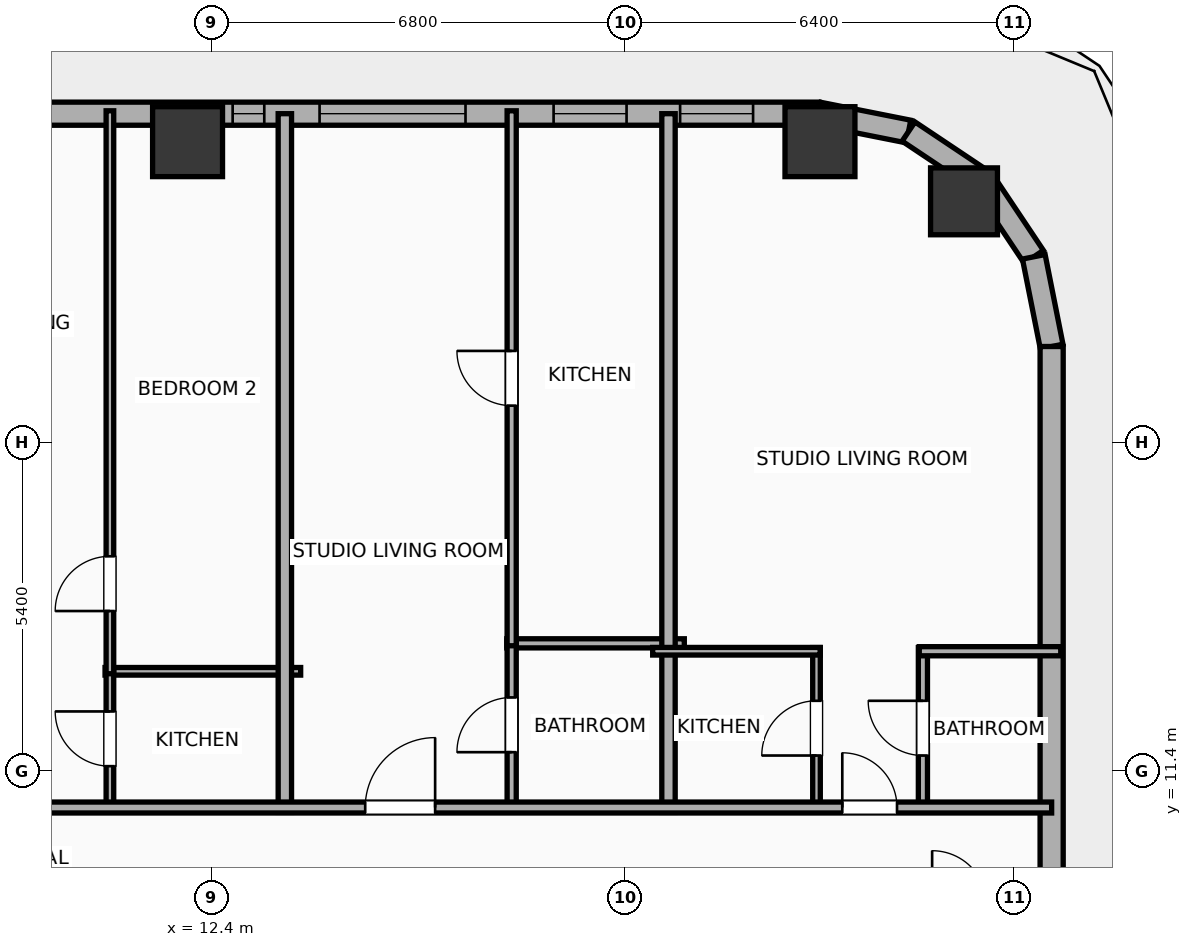
"""IFC4 building model, lengths in metres.
Left out: names, types, materials, properties, quantities, classifications, styles, units other than length and angle.
Written with IfcOpenShell. Run it as: python <this file> out.ifc"""

import sys

from ifc_helpers import new_model, si_unit, direction, frame, frame_2d, origin, origin_2d, place, context, subcontext, project, spatial, rectangle, hollow_rectangle, hollow_circle, extrude, element, fill, save


model = new_model("IFC4")
c1 = context("Model", 3, precision=1e-05, world=origin(), true_north=direction((0.0, 1.0)))
c2 = subcontext(c1, "Body", "Model", "MODEL_VIEW")
j1 = project(units=[si_unit("LENGTHUNIT", "METRE"), si_unit("PLANEANGLEUNIT", "RADIAN")], contexts=[c1])
p1 = place(None, origin())
s1 = spatial("IfcSite", under=j1, at=p1, CompositionType="ELEMENT")
p2 = place(p1, origin())
s2 = spatial("IfcBuilding", under=s1, at=p2, CompositionType="ELEMENT")
p3 = place(p2, frame((0.0, 0.0, 53.3)))
s3 = spatial("IfcBuildingStorey", under=s2, at=p3, CompositionType="ELEMENT", Elevation=53.3)
p4 = place(p3, frame((24.769, 20.769, 0.0), z_axis=(0.0, 0.0, 1.0), x_axis=(1.0, 0.0, 0.0)))
e1 = element("IfcColumn", 1, at=p4, inside=s3, PredefinedType="COLUMN", context=c2, shape_type="SweptSolid", body=[
    extrude(hollow_circle(Radius=0.55, WallThickness=0.036, at=origin_2d()), origin(), (0.0, 0.0, 1.0), 3.9),
])
for number, where, z_axis, x_axis in (
    (2, (22.4, 21.75, 0.0), (0.0, 0.0, 1.0), (1.0, 0.0, 0.0)),
    (3, (12.0, 21.75, 0.0), (0.0, 0.0, 1.0), (1.0, 0.0, 0.0)),
):
    element("IfcColumn", number, at=place(p3, frame(where, z_axis=z_axis, x_axis=x_axis)), inside=s3, PredefinedType="COLUMN", context=c2, shape_type="SweptSolid", body=[
        extrude(hollow_rectangle(XDim=1.15, YDim=1.15, WallThickness=0.04, at=origin_2d()), origin(), (0.0, 0.0, 1.0), 3.9),
    ])
p5 = place(p3, frame((-29.581, 22.21, 0.0), z_axis=(0.0, 0.0, 1.0), x_axis=(1.0, 0.0, 0.0)))
e4 = element("IfcWall", 4, at=p5, inside=s3, PredefinedType="ELEMENTEDWALL", context=c2, shape_type="SweptSolid", body=[
    extrude(rectangle(XDim=51.963, YDim=0.38, at=frame_2d((25.981, 0.0))), origin(), (0.0, 0.0, 1.0), 3.65),
])
p6 = place(p5, frame((6.61, 0.0, 0.75)))
e5 = element("IfcOpeningElement", 5, at=p6, cuts=e4, PredefinedType="OPENING", context=c2, shape_type="SweptSolid", body=[
    extrude(rectangle(XDim=2.4, YDim=2.1, at=frame_2d((1.2, 1.05))), frame((0.0, 0.2, 0.0), z_axis=(0.0, -1.0, 0.0), x_axis=(1.0, 0.0, 0.0)), (0.0, 0.0, 1.0), 0.4),
])
p7 = place(p5, frame((26.431, 0.0, 0.75)))
e6 = element("IfcOpeningElement", 6, at=p7, cuts=e4, PredefinedType="OPENING", context=c2, shape_type="SweptSolid", body=[
    extrude(rectangle(XDim=2.4, YDim=2.1, at=frame_2d((1.2, 1.05))), frame((0.0, 0.2, 0.0), z_axis=(0.0, -1.0, 0.0), x_axis=(1.0, 0.0, 0.0)), (0.0, 0.0, 1.0), 0.4),
])
p8 = place(p5, frame((43.752, 0.0, 0.75)))
e7 = element("IfcOpeningElement", 7, at=p8, cuts=e4, PredefinedType="OPENING", context=c2, shape_type="SweptSolid", body=[
    extrude(rectangle(XDim=2.4, YDim=2.1, at=frame_2d((1.2, 1.05))), frame((0.0, 0.2, 0.0), z_axis=(0.0, -1.0, 0.0), x_axis=(1.0, 0.0, 0.0)), (0.0, 0.0, 1.0), 0.4),
])
p9 = place(p5, frame((2.789, 0.0, 0.75)))
e8 = element("IfcOpeningElement", 8, at=p9, cuts=e4, PredefinedType="OPENING", context=c2, shape_type="SweptSolid", body=[
    extrude(rectangle(XDim=1.2, YDim=2.05, at=frame_2d((0.6, 1.025))), frame((0.0, 0.2, 0.0), z_axis=(0.0, -1.0, 0.0), x_axis=(1.0, 0.0, 0.0)), (0.0, 0.0, 1.0), 0.4),
])
p10 = place(p5, frame((16.831, 0.0, 0.75)))
e9 = element("IfcOpeningElement", 9, at=p10, cuts=e4, PredefinedType="OPENING", context=c2, shape_type="SweptSolid", body=[
    extrude(rectangle(XDim=1.2, YDim=2.05, at=frame_2d((0.6, 1.025))), frame((0.0, 0.2, 0.0), z_axis=(0.0, -1.0, 0.0), x_axis=(1.0, 0.0, 0.0)), (0.0, 0.0, 1.0), 0.4),
])
p11 = place(p5, frame((13.136, 0.0, 0.75)))
e10 = element("IfcOpeningElement", 10, at=p11, cuts=e4, PredefinedType="OPENING", context=c2, shape_type="SweptSolid", body=[
    extrude(rectangle(XDim=1.2, YDim=2.05, at=frame_2d((0.6, 1.025))), frame((0.0, 0.2, 0.0), z_axis=(0.0, -1.0, 0.0), x_axis=(1.0, 0.0, 0.0)), (0.0, 0.0, 1.0), 0.4),
])
p12 = place(p5, frame((21.456, 0.0, 0.75)))
e11 = element("IfcOpeningElement", 11, at=p12, cuts=e4, PredefinedType="OPENING", context=c2, shape_type="SweptSolid", body=[
    extrude(rectangle(XDim=0.52, YDim=2.05, at=frame_2d((0.26, 1.025))), frame((0.0, 0.2, 0.0), z_axis=(0.0, -1.0, 0.0), x_axis=(1.0, 0.0, 0.0)), (0.0, 0.0, 1.0), 0.4),
])
p13 = place(p5, frame((23.507, 0.0, 0.75)))
e12 = element("IfcOpeningElement", 12, at=p13, cuts=e4, PredefinedType="OPENING", context=c2, shape_type="SweptSolid", body=[
    extrude(rectangle(XDim=1.2, YDim=2.05, at=frame_2d((0.6, 1.025))), frame((0.0, 0.2, 0.0), z_axis=(0.0, -1.0, 0.0), x_axis=(1.0, 0.0, 0.0)), (0.0, 0.0, 1.0), 0.4),
])
p14 = place(p5, frame((37.494, 0.0, 0.75)))
e13 = element("IfcOpeningElement", 13, at=p14, cuts=e4, PredefinedType="OPENING", context=c2, shape_type="SweptSolid", body=[
    extrude(rectangle(XDim=1.2, YDim=2.05, at=frame_2d((0.6, 1.025))), frame((0.0, 0.2, 0.0), z_axis=(0.0, -1.0, 0.0), x_axis=(1.0, 0.0, 0.0)), (0.0, 0.0, 1.0), 0.4),
])
p15 = place(p5, frame((33.733, 0.0, 0.75)))
e14 = element("IfcOpeningElement", 14, at=p15, cuts=e4, PredefinedType="OPENING", context=c2, shape_type="SweptSolid", body=[
    extrude(rectangle(XDim=1.2, YDim=2.05, at=frame_2d((0.6, 1.025))), frame((0.0, 0.2, 0.0), z_axis=(0.0, -1.0, 0.0), x_axis=(1.0, 0.0, 0.0)), (0.0, 0.0, 1.0), 0.4),
])
p16 = place(p5, frame((42.323, 0.0, 0.75)))
e15 = element("IfcOpeningElement", 15, at=p16, cuts=e4, PredefinedType="OPENING", context=c2, shape_type="SweptSolid", body=[
    extrude(rectangle(XDim=0.52, YDim=2.05, at=frame_2d((0.26, 1.025))), frame((0.0, 0.2, 0.0), z_axis=(0.0, -1.0, 0.0), x_axis=(1.0, 0.0, 0.0)), (0.0, 0.0, 1.0), 0.4),
])
p17 = place(p5, frame((47.601, 0.0, 0.75)))
e16 = element("IfcOpeningElement", 16, at=p17, cuts=e4, PredefinedType="OPENING", context=c2, shape_type="SweptSolid", body=[
    extrude(rectangle(XDim=1.2, YDim=2.05, at=frame_2d((0.6, 1.025))), frame((0.0, 0.2, 0.0), z_axis=(0.0, -1.0, 0.0), x_axis=(1.0, 0.0, 0.0)), (0.0, 0.0, 1.0), 0.4),
])
p18 = place(p5, frame((49.681, 0.0, 0.75)))
e17 = element("IfcOpeningElement", 17, at=p18, cuts=e4, PredefinedType="OPENING", context=c2, shape_type="SweptSolid", body=[
    extrude(rectangle(XDim=1.2, YDim=2.05, at=frame_2d((0.6, 1.025))), frame((0.0, 0.2, 0.0), z_axis=(0.0, -1.0, 0.0), x_axis=(1.0, 0.0, 0.0)), (0.0, 0.0, 1.0), 0.4),
])
p19 = place(p3, frame((22.381, 22.21, 0.0), z_axis=(0.0, 0.0, 1.0), x_axis=(0.980786132421, -0.195086038585, 0.0)))
e18 = element("IfcWall", 18, at=p19, inside=s3, PredefinedType="ELEMENTEDWALL", context=c2, shape_type="SweptSolid", body=[
    extrude(rectangle(XDim=1.504, YDim=0.38, at=frame_2d((0.752, 0.0))), origin(), (0.0, 0.0, 1.0), 3.65),
])
for number, where, z_axis, x_axis in (
    (19, (23.857, 21.917, 0.0), (0.0, 0.0, 1.0), (0.831, -0.556, 0.0)),
    (20, (25.091, 21.091, 0.0), (0.0, 0.0, 1.0), (0.556, -0.831, 0.0)),
):
    element("IfcWall", number, at=place(p3, frame(where, z_axis=z_axis, x_axis=x_axis)), inside=s3, PredefinedType="ELEMENTEDWALL", context=c2, shape_type="SweptSolid", body=[
        extrude(rectangle(XDim=1.485, YDim=0.38, at=frame_2d((0.743, 0.0))), origin(), (0.0, 0.0, 1.0), 3.65),
    ])
p20 = place(p3, frame((25.917, 19.857, 0.0), z_axis=(0.0, 0.0, 1.0), x_axis=(0.195086038585, -0.980786132421, 0.0)))
e21 = element("IfcWall", 21, at=p20, inside=s3, PredefinedType="ELEMENTEDWALL", context=c2, shape_type="SweptSolid", body=[
    extrude(rectangle(XDim=1.504, YDim=0.38, at=frame_2d((0.752, 0.0))), origin(), (0.0, 0.0, 1.0), 3.65),
])
p21 = place(p3, frame((26.21, 18.381, 0.0), z_axis=(0.0, 0.0, 1.0), x_axis=(0.0, -1.0, 0.0)))
e22 = element("IfcWall", 22, at=p21, inside=s3, PredefinedType="ELEMENTEDWALL", context=c2, shape_type="SweptSolid", body=[
    extrude(rectangle(XDim=36.763, YDim=0.38, at=frame_2d((18.381, 0.0))), origin(), (0.0, 0.0, 1.0), 3.65),
])
p22 = place(p21, frame((33.537, 0.0, 0.75)))
e23 = element("IfcOpeningElement", 23, at=p22, cuts=e22, PredefinedType="OPENING", context=c2, shape_type="SweptSolid", body=[
    extrude(rectangle(XDim=1.2, YDim=2.05, at=frame_2d((0.6, 1.025))), frame((0.0, 0.2, 0.0), z_axis=(0.0, -1.0, 0.0), x_axis=(1.0, 0.0, 0.0)), (0.0, 0.0, 1.0), 0.4),
])
p23 = place(p3, frame((10.643, 13.04, 0.0), z_axis=(0.0, 0.0, 1.0), x_axis=(1.0, 0.0, 0.0)))
e24 = element("IfcWall", 24, at=p23, inside=s3, PredefinedType="PARTITIONING", context=c2, shape_type="SweptSolid", body=[
    extrude(rectangle(XDim=3.217, YDim=0.125, at=frame_2d((1.608, 0.0))), origin(), (0.0, 0.0, 1.0), 3.65),
])
p24 = place(p3, frame((10.723, 10.78, 0.0), z_axis=(0.0, 0.0, 1.0), x_axis=(0.0, 1.0, 0.0)))
e25 = element("IfcWall", 25, at=p24, inside=s3, PredefinedType="PARTITIONING", context=c2, shape_type="SweptSolid", body=[
    extrude(rectangle(XDim=2.3, YDim=0.125, at=frame_2d((1.15, 0.0))), origin(), (0.0, 0.0, 1.0), 3.65),
])
p25 = place(p24, frame((0.7, 0.0, 0.0)))
e26 = element("IfcOpeningElement", 26, at=p25, cuts=e25, PredefinedType="OPENING", context=c2, shape_type="SweptSolid", body=[
    extrude(rectangle(XDim=0.9, YDim=2.05, at=frame_2d((0.45, 1.025))), frame((0.0, 0.073, 0.0), z_axis=(0.0, -1.0, 0.0), x_axis=(1.0, 0.0, 0.0)), (0.0, 0.0, 1.0), 0.145),
])
p26 = place(p3, frame((10.723, 13.0, 0.0), z_axis=(0.0, 0.0, 1.0), x_axis=(0.0, 1.0, 0.0)))
e27 = element("IfcWall", 27, at=p26, inside=s3, PredefinedType="PARTITIONING", context=c2, shape_type="SweptSolid", body=[
    extrude(rectangle(XDim=9.258, YDim=0.125, at=frame_2d((4.629, 0.0))), origin(), (0.0, 0.0, 1.0), 3.65),
])
p27 = place(p26, frame((1.031, 0.0, 0.0)))
e28 = element("IfcOpeningElement", 28, at=p27, cuts=e27, PredefinedType="OPENING", context=c2, shape_type="SweptSolid", body=[
    extrude(rectangle(XDim=0.9, YDim=2.05, at=frame_2d((0.45, 1.025))), frame((0.0, 0.073, 0.0), z_axis=(0.0, -1.0, 0.0), x_axis=(1.0, 0.0, 0.0)), (0.0, 0.0, 1.0), 0.145),
])
p28 = place(p3, frame((13.6, 10.72, 0.0), z_axis=(0.0, 0.0, 1.0), x_axis=(0.0, 1.0, 0.0)))
e29 = element("IfcWall", 29, at=p28, inside=s3, PredefinedType="PARTITIONING", context=c2, shape_type="SweptSolid", body=[
    extrude(rectangle(XDim=11.49, YDim=0.22, at=frame_2d((5.745, 0.0))), origin(), (0.0, 0.0, 1.0), 3.65),
])
p29 = place(p3, frame((17.25, 13.5, 0.0), z_axis=(0.0, 0.0, 1.0), x_axis=(1.0, 0.0, 0.0)))
e30 = element("IfcWall", 30, at=p29, inside=s3, PredefinedType="PLUMBINGWALL", context=c2, shape_type="SweptSolid", body=[
    extrude(rectangle(XDim=2.919, YDim=0.15, at=frame_2d((1.459, 0.0))), origin(), (0.0, 0.0, 1.0), 3.65),
])
p30 = place(p3, frame((17.33, 10.78, 0.0), z_axis=(0.0, 0.0, 1.0), x_axis=(0.0, 1.0, 0.0)))
e31 = element("IfcWall", 31, at=p30, inside=s3, PredefinedType="PLUMBINGWALL", context=c2, shape_type="SweptSolid", body=[
    extrude(rectangle(XDim=2.76, YDim=0.15, at=frame_2d((1.38, 0.0))), origin(), (0.0, 0.0, 1.0), 3.65),
])
p31 = place(p30, frame((0.93, 0.0, 0.0)))
e32 = element("IfcOpeningElement", 32, at=p31, cuts=e31, PredefinedType="OPENING", context=c2, shape_type="SweptSolid", body=[
    extrude(rectangle(XDim=0.9, YDim=2.05, at=frame_2d((0.45, 1.025))), frame((0.0, 0.085, 0.0), z_axis=(0.0, -1.0, 0.0), x_axis=(1.0, 0.0, 0.0)), (0.0, 0.0, 1.0), 0.17),
])
p32 = place(p3, frame((17.33, 13.46, 0.0), z_axis=(0.0, 0.0, 1.0), x_axis=(0.0, 1.0, 0.0)))
e33 = element("IfcWall", 33, at=p32, inside=s3, PredefinedType="PLUMBINGWALL", context=c2, shape_type="SweptSolid", body=[
    extrude(rectangle(XDim=8.798, YDim=0.15, at=frame_2d((4.399, 0.0))), origin(), (0.0, 0.0, 1.0), 3.65),
])
p33 = place(p32, frame((3.949, 0.0, 0.0)))
e34 = element("IfcOpeningElement", 34, at=p33, cuts=e33, PredefinedType="OPENING", context=c2, shape_type="SweptSolid", body=[
    extrude(rectangle(XDim=0.9, YDim=2.05, at=frame_2d((0.45, 1.025))), frame((0.0, 0.085, 0.0), z_axis=(0.0, -1.0, 0.0), x_axis=(1.0, 0.0, 0.0)), (0.0, 0.0, 1.0), 0.17),
])
p34 = place(p3, frame((19.909, 10.72, 0.0), z_axis=(0.0, 0.0, 1.0), x_axis=(0.0, 1.0, 0.0)))
e35 = element("IfcWall", 35, at=p34, inside=s3, PredefinedType="PARTITIONING", context=c2, shape_type="SweptSolid", body=[
    extrude(rectangle(XDim=11.49, YDim=0.22, at=frame_2d((5.745, 0.0))), origin(), (0.0, 0.0, 1.0), 3.65),
])
p35 = place(p3, frame((22.343, 10.78, 0.0), z_axis=(0.0, 0.0, 1.0), x_axis=(0.0, 1.0, 0.0)))
e36 = element("IfcWall", 36, at=p35, inside=s3, PredefinedType="PARTITIONING", context=c2, shape_type="SweptSolid", body=[
    extrude(rectangle(XDim=2.65, YDim=0.125, at=frame_2d((1.325, 0.0))), origin(), (0.0, 0.0, 1.0), 3.65),
])
p36 = place(p35, frame((0.875, 0.0, 0.0)))
e37 = element("IfcOpeningElement", 37, at=p36, cuts=e36, PredefinedType="OPENING", context=c2, shape_type="SweptSolid", body=[
    extrude(rectangle(XDim=0.9, YDim=2.05, at=frame_2d((0.45, 1.025))), frame((0.0, 0.073, 0.0), z_axis=(0.0, -1.0, 0.0), x_axis=(1.0, 0.0, 0.0)), (0.0, 0.0, 1.0), 0.145),
])
p37 = place(p3, frame((24.093, 10.78, 0.0), z_axis=(0.0, 0.0, 1.0), x_axis=(0.0, 1.0, 0.0)))
e38 = element("IfcWall", 38, at=p37, inside=s3, PredefinedType="PLUMBINGWALL", context=c2, shape_type="SweptSolid", body=[
    extrude(rectangle(XDim=2.65, YDim=0.15, at=frame_2d((1.325, 0.0))), origin(), (0.0, 0.0, 1.0), 3.65),
])
p38 = place(p37, frame((0.875, 0.0, 0.0)))
e39 = element("IfcOpeningElement", 39, at=p38, cuts=e38, PredefinedType="OPENING", context=c2, shape_type="SweptSolid", body=[
    extrude(rectangle(XDim=0.9, YDim=2.05, at=frame_2d((0.45, 1.025))), frame((0.0, 0.085, 0.0), z_axis=(0.0, -1.0, 0.0), x_axis=(1.0, 0.0, 0.0)), (0.0, 0.0, 1.0), 0.17),
])
p39 = place(p3, frame((19.649, 13.37, 0.0), z_axis=(0.0, 0.0, 1.0), x_axis=(1.0, 0.0, 0.0)))
e40 = element("IfcWall", 40, at=p39, inside=s3, PredefinedType="PARTITIONING", context=c2, shape_type="SweptSolid", body=[
    extrude(rectangle(XDim=2.754, YDim=0.125, at=frame_2d((1.377, 0.0))), origin(), (0.0, 0.0, 1.0), 3.65),
])
p40 = place(p3, frame((24.033, 13.37, 0.0), z_axis=(0.0, 0.0, 1.0), x_axis=(1.0, 0.0, 0.0)))
e41 = element("IfcWall", 41, at=p40, inside=s3, PredefinedType="PLUMBINGWALL", context=c2, shape_type="SweptSolid", body=[
    extrude(rectangle(XDim=2.327, YDim=0.15, at=frame_2d((1.164, 0.0))), origin(), (0.0, 0.0, 1.0), 3.65),
])
p41 = place(p3, frame((-33.41, 10.8, 0.0), z_axis=(0.0, 0.0, 1.0), x_axis=(1.0, 0.0, 0.0)))
e42 = element("IfcWall", 42, at=p41, inside=s3, PredefinedType="PARTITIONING", context=c2, shape_type="SweptSolid", body=[
    extrude(rectangle(XDim=59.62, YDim=0.18, at=frame_2d((29.81, 0.0))), origin(), (0.0, 0.0, 1.0), 3.65),
])
p42 = place(p41, frame((2.501, 0.0, 0.0)))
e43 = element("IfcOpeningElement", 43, at=p42, cuts=e42, PredefinedType="OPENING", context=c2, shape_type="SweptSolid", body=[
    extrude(rectangle(XDim=0.9, YDim=2.05, at=frame_2d((0.45, 1.025))), frame((0.0, 0.1, 0.0), z_axis=(0.0, -1.0, 0.0), x_axis=(1.0, 0.0, 0.0)), (0.0, 0.0, 1.0), 0.2),
])
p43 = place(p41, frame((10.156, 0.0, 0.0)))
e44 = element("IfcOpeningElement", 44, at=p43, cuts=e42, PredefinedType="OPENING", context=c2, shape_type="SweptSolid", body=[
    extrude(rectangle(XDim=1.15, YDim=2.05, at=frame_2d((0.575, 1.025))), frame((0.0, 0.1, 0.0), z_axis=(0.0, -1.0, 0.0), x_axis=(1.0, 0.0, 0.0)), (0.0, 0.0, 1.0), 0.2),
])
p44 = place(p41, frame((20.686, 0.0, 0.0)))
e45 = element("IfcOpeningElement", 45, at=p44, cuts=e42, PredefinedType="OPENING", context=c2, shape_type="SweptSolid", body=[
    extrude(rectangle(XDim=1.15, YDim=2.05, at=frame_2d((0.575, 1.025))), frame((0.0, 0.1, 0.0), z_axis=(0.0, -1.0, 0.0), x_axis=(1.0, 0.0, 0.0)), (0.0, 0.0, 1.0), 0.2),
])
p45 = place(p41, frame((30.982, 0.0, 0.0)))
e46 = element("IfcOpeningElement", 46, at=p45, cuts=e42, PredefinedType="OPENING", context=c2, shape_type="SweptSolid", body=[
    extrude(rectangle(XDim=1.15, YDim=2.05, at=frame_2d((0.575, 1.025))), frame((0.0, 0.1, 0.0), z_axis=(0.0, -1.0, 0.0), x_axis=(1.0, 0.0, 0.0)), (0.0, 0.0, 1.0), 0.2),
])
p46 = place(p41, frame((41.35, 0.0, 0.0)))
e47 = element("IfcOpeningElement", 47, at=p46, cuts=e42, PredefinedType="OPENING", context=c2, shape_type="SweptSolid", body=[
    extrude(rectangle(XDim=1.15, YDim=2.05, at=frame_2d((0.575, 1.025))), frame((0.0, 0.1, 0.0), z_axis=(0.0, -1.0, 0.0), x_axis=(1.0, 0.0, 0.0)), (0.0, 0.0, 1.0), 0.2),
])
p47 = place(p41, frame((48.331, 0.0, 0.0)))
e48 = element("IfcOpeningElement", 48, at=p47, cuts=e42, PredefinedType="OPENING", context=c2, shape_type="SweptSolid", body=[
    extrude(rectangle(XDim=1.15, YDim=2.05, at=frame_2d((0.575, 1.025))), frame((0.0, 0.1, 0.0), z_axis=(0.0, -1.0, 0.0), x_axis=(1.0, 0.0, 0.0)), (0.0, 0.0, 1.0), 0.2),
])
p48 = place(p41, frame((56.177, 0.0, 0.0)))
e49 = element("IfcOpeningElement", 49, at=p48, cuts=e42, PredefinedType="OPENING", context=c2, shape_type="SweptSolid", body=[
    extrude(rectangle(XDim=0.9, YDim=2.05, at=frame_2d((0.45, 1.025))), frame((0.0, 0.1, 0.0), z_axis=(0.0, -1.0, 0.0), x_axis=(1.0, 0.0, 0.0)), (0.0, 0.0, 1.0), 0.2),
])
p49 = place(p8, origin())
e50 = element("IfcWindow", 50, at=p49, inside=s3, PartitioningType="SINGLE_PANEL", PredefinedType="WINDOW", context=c2, shape_type="SweptSolid", body=[
    extrude(rectangle(XDim=2.4, YDim=2.1, at=frame_2d((1.2, 1.05))), frame((0.0, 0.03, 0.0), z_axis=(0.0, -1.0, 0.0), x_axis=(1.0, 0.0, 0.0)), (0.0, 0.0, 1.0), 0.06),
])
fill(e7, e50)
p50 = place(p16, origin())
e51 = element("IfcWindow", 51, at=p50, inside=s3, PartitioningType="SINGLE_PANEL", PredefinedType="WINDOW", context=c2, shape_type="SweptSolid", body=[
    extrude(rectangle(XDim=0.52, YDim=2.05, at=frame_2d((0.26, 1.025))), frame((0.0, 0.03, 0.0), z_axis=(0.0, -1.0, 0.0), x_axis=(1.0, 0.0, 0.0)), (0.0, 0.0, 1.0), 0.06),
])
fill(e15, e51)
p51 = place(p17, origin())
e52 = element("IfcWindow", 52, at=p51, inside=s3, PartitioningType="SINGLE_PANEL", PredefinedType="WINDOW", context=c2, shape_type="SweptSolid", body=[
    extrude(rectangle(XDim=1.2, YDim=2.05, at=frame_2d((0.6, 1.025))), frame((0.0, 0.03, 0.0), z_axis=(0.0, -1.0, 0.0), x_axis=(1.0, 0.0, 0.0)), (0.0, 0.0, 1.0), 0.06),
])
fill(e16, e52)
p52 = place(p18, origin())
e53 = element("IfcWindow", 53, at=p52, inside=s3, PartitioningType="SINGLE_PANEL", PredefinedType="WINDOW", context=c2, shape_type="SweptSolid", body=[
    extrude(rectangle(XDim=1.2, YDim=2.05, at=frame_2d((0.6, 1.025))), frame((0.0, 0.03, 0.0), z_axis=(0.0, -1.0, 0.0), x_axis=(1.0, 0.0, 0.0)), (0.0, 0.0, 1.0), 0.06),
])
fill(e17, e53)
p53 = place(p25, origin())
e54 = element("IfcDoor", 54, at=p53, inside=s3, OperationType="SINGLE_SWING_RIGHT", PredefinedType="DOOR", context=c2, shape_type="SweptSolid", body=[
    extrude(rectangle(XDim=0.9, YDim=2.05, at=frame_2d((0.45, 1.025))), frame((0.0, 0.025, 0.0), z_axis=(0.0, -1.0, 0.0), x_axis=(1.0, 0.0, 0.0)), (0.0, 0.0, 1.0), 0.05),
])
fill(e26, e54)
p54 = place(p27, origin())
e55 = element("IfcDoor", 55, at=p54, inside=s3, OperationType="SINGLE_SWING_LEFT", PredefinedType="DOOR", context=c2, shape_type="SweptSolid", body=[
    extrude(rectangle(XDim=0.9, YDim=2.05, at=frame_2d((0.45, 1.025))), frame((0.0, 0.025, 0.0), z_axis=(0.0, -1.0, 0.0), x_axis=(1.0, 0.0, 0.0)), (0.0, 0.0, 1.0), 0.05),
])
fill(e28, e55)
p55 = place(p31, origin())
e56 = element("IfcDoor", 56, at=p55, inside=s3, OperationType="SINGLE_SWING_LEFT", PredefinedType="DOOR", context=c2, shape_type="SweptSolid", body=[
    extrude(rectangle(XDim=0.9, YDim=2.05, at=frame_2d((0.45, 1.025))), frame((0.0, 0.025, 0.0), z_axis=(0.0, -1.0, 0.0), x_axis=(1.0, 0.0, 0.0)), (0.0, 0.0, 1.0), 0.05),
])
fill(e32, e56)
p56 = place(p33, origin())
e57 = element("IfcDoor", 57, at=p56, inside=s3, OperationType="SINGLE_SWING_RIGHT", PredefinedType="DOOR", context=c2, shape_type="SweptSolid", body=[
    extrude(rectangle(XDim=0.9, YDim=2.05, at=frame_2d((0.45, 1.025))), frame((0.0, 0.025, 0.0), z_axis=(0.0, -1.0, 0.0), x_axis=(1.0, 0.0, 0.0)), (0.0, 0.0, 1.0), 0.05),
])
fill(e34, e57)
p57 = place(p36, origin())
e58 = element("IfcDoor", 58, at=p57, inside=s3, OperationType="SINGLE_SWING_LEFT", PredefinedType="DOOR", context=c2, shape_type="SweptSolid", body=[
    extrude(rectangle(XDim=0.9, YDim=2.05, at=frame_2d((0.45, 1.025))), frame((0.0, 0.025, 0.0), z_axis=(0.0, -1.0, 0.0), x_axis=(1.0, 0.0, 0.0)), (0.0, 0.0, 1.0), 0.05),
])
fill(e37, e58)
p58 = place(p38, origin())
e59 = element("IfcDoor", 59, at=p58, inside=s3, OperationType="SINGLE_SWING_RIGHT", PredefinedType="DOOR", context=c2, shape_type="SweptSolid", body=[
    extrude(rectangle(XDim=0.9, YDim=2.05, at=frame_2d((0.45, 1.025))), frame((0.0, 0.025, 0.0), z_axis=(0.0, -1.0, 0.0), x_axis=(1.0, 0.0, 0.0)), (0.0, 0.0, 1.0), 0.05),
])
fill(e39, e59)
p59 = place(p47, origin())
e60 = element("IfcDoor", 60, at=p59, inside=s3, OperationType="SINGLE_SWING_RIGHT", PredefinedType="DOOR", context=c2, shape_type="SweptSolid", body=[
    extrude(rectangle(XDim=1.15, YDim=2.05, at=frame_2d((0.575, 1.025))), frame((0.0, 0.025, 0.0), z_axis=(0.0, -1.0, 0.0), x_axis=(1.0, 0.0, 0.0)), (0.0, 0.0, 1.0), 0.05),
])
fill(e48, e60)
p60 = place(p48, origin())
e61 = element("IfcDoor", 61, at=p60, inside=s3, OperationType="SINGLE_SWING_LEFT", PredefinedType="DOOR", context=c2, shape_type="SweptSolid", body=[
    extrude(rectangle(XDim=0.9, YDim=2.05, at=frame_2d((0.45, 1.025))), frame((0.0, 0.025, 0.0), z_axis=(0.0, -1.0, 0.0), x_axis=(1.0, 0.0, 0.0)), (0.0, 0.0, 1.0), 0.05),
])
fill(e49, e61)
save(model, sys.argv[1])
